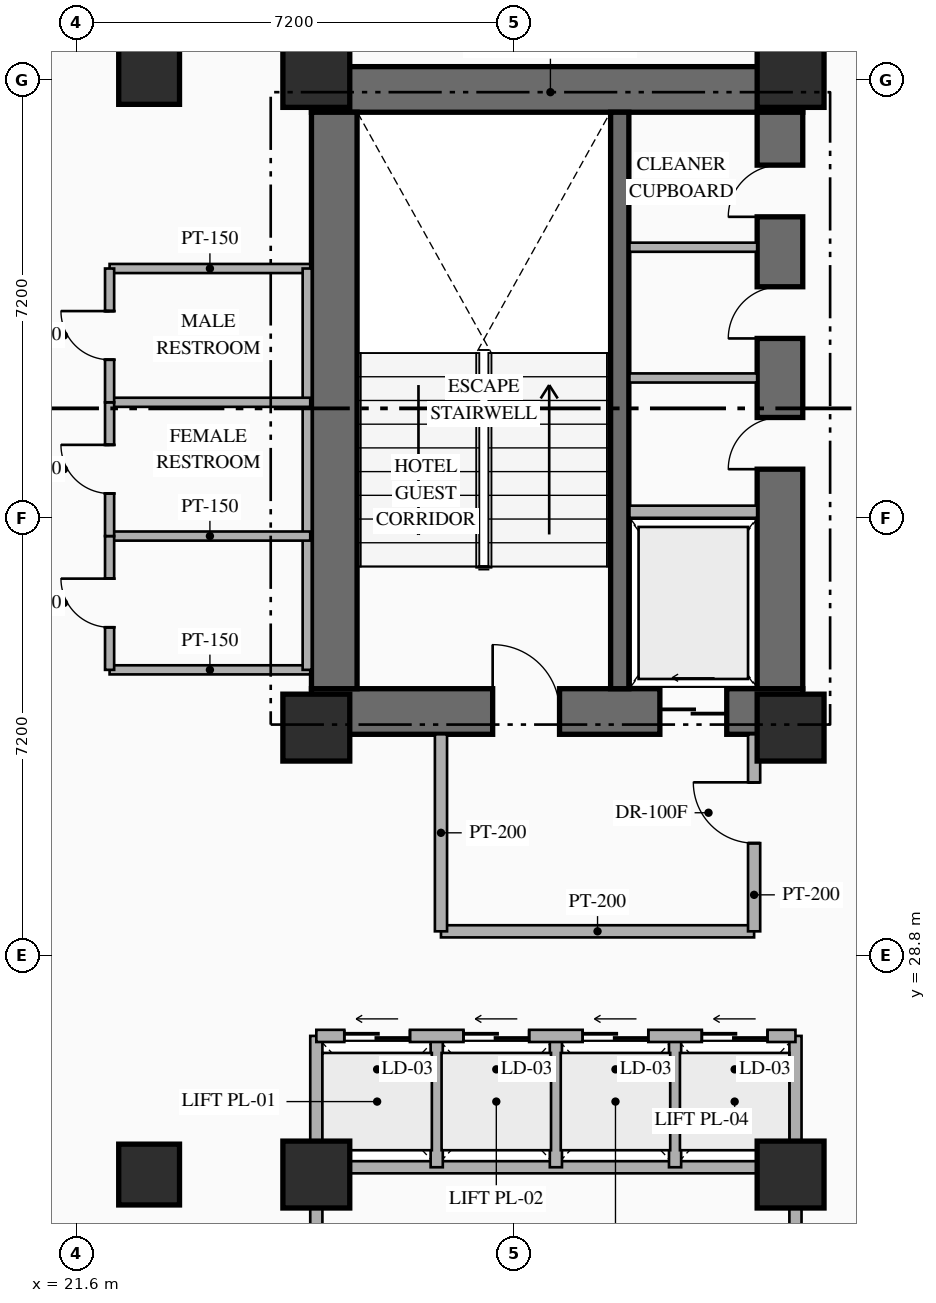
"""IFC4 building model, lengths in metres.
Left out: names, types, materials, properties, quantities, classifications, styles, units other than length and angle.
Written with IfcOpenShell. Run it as: python <this file> out.ifc"""

import sys

from ifc_helpers import new_model, si_unit, direction, frame, frame_2d, origin, origin_2d, place, context, subcontext, project, spatial, rectangle, hollow_rectangle, extrude, element, fill, save


model = new_model("IFC4")
c1 = context("Model", 3, precision=1e-05, world=origin(), true_north=direction((0.0, 1.0)))
c2 = subcontext(c1, "Body", "Model", "MODEL_VIEW")
j1 = project(units=[si_unit("LENGTHUNIT", "METRE"), si_unit("PLANEANGLEUNIT", "RADIAN")], contexts=[c1])
p1 = place(None, origin())
s1 = spatial("IfcSite", under=j1, at=p1, CompositionType="ELEMENT")
p2 = place(p1, origin())
s2 = spatial("IfcBuilding", under=s1, at=p2, CompositionType="ELEMENT")
p3 = place(p2, frame((0.0, 0.0, 39.95)))
s3 = spatial("IfcBuildingStorey", under=s2, at=p3, CompositionType="ELEMENT", Elevation=39.95)
p4 = place(p3, frame((25.47, 32.815, 0.0), z_axis=(0.0, 0.0, 1.0), x_axis=(1.0, 0.0, 0.0)))
e1 = element("IfcWall", 1, at=p4, inside=s3, PredefinedType="SHEAR", context=c2, shape_type="SweptSolid", body=[
    extrude(rectangle(XDim=8.08, YDim=0.75, at=frame_2d((4.04, 0.0))), origin(), (0.0, 0.0, 1.0), 3.35),
])
p5 = place(p4, frame((2.98, 0.0, 0.0)))
e2 = element("IfcOpeningElement", 2, at=p5, cuts=e1, PredefinedType="OPENING", context=c2, shape_type="SweptSolid", body=[
    extrude(rectangle(XDim=1.1, YDim=2.2, at=frame_2d((0.55, 1.1))), frame((0.0, 0.385, 0.0), z_axis=(0.0, -1.0, 0.0), x_axis=(1.0, 0.0, 0.0)), (0.0, 0.0, 1.0), 0.77),
])
p6 = place(p4, frame((5.73, 0.0, 0.0)))
e3 = element("IfcOpeningElement", 3, at=p6, cuts=e1, PredefinedType="OPENING", context=c2, shape_type="SweptSolid", body=[
    extrude(rectangle(XDim=1.1, YDim=2.15, at=frame_2d((0.55, 1.075))), frame((0.0, 0.385, 0.0), z_axis=(0.0, -1.0, 0.0), x_axis=(1.0, 0.0, 0.0)), (0.0, 0.0, 1.0), 0.77),
])
p7 = place(p3, frame((25.47, 43.045, 0.0), z_axis=(0.0, 0.0, 1.0), x_axis=(1.0, 0.0, 0.0)))
e4 = element("IfcWall", 4, at=p7, inside=s3, PredefinedType="SHEAR", context=c2, shape_type="SweptSolid", body=[
    extrude(rectangle(XDim=8.08, YDim=0.75, at=frame_2d((4.04, 0.0))), origin(), (0.0, 0.0, 1.0), 3.35),
])
p8 = place(p3, frame((25.845, 33.19, 0.0), z_axis=(0.0, 0.0, 1.0), x_axis=(0.0, 1.0, 0.0)))
e5 = element("IfcWall", 5, at=p8, inside=s3, PredefinedType="SHEAR", context=c2, shape_type="SweptSolid", body=[
    extrude(rectangle(XDim=9.48, YDim=0.75, at=frame_2d((4.74, 0.0))), origin(), (0.0, 0.0, 1.0), 3.35),
])
p9 = place(p3, frame((33.175, 33.19, 0.0), z_axis=(0.0, 0.0, 1.0), x_axis=(0.0, 1.0, 0.0)))
e6 = element("IfcWall", 6, at=p9, inside=s3, PredefinedType="SHEAR", context=c2, shape_type="SweptSolid", body=[
    extrude(rectangle(XDim=9.48, YDim=0.75, at=frame_2d((4.74, 0.0))), origin(), (0.0, 0.0, 1.0), 3.35),
])
p10 = place(p9, frame((3.61, 0.0, 0.0)))
e7 = element("IfcOpeningElement", 7, at=p10, cuts=e6, PredefinedType="OPENING", context=c2, shape_type="SweptSolid", body=[
    extrude(rectangle(XDim=0.85, YDim=2.08, at=frame_2d((0.425, 1.04))), frame((0.0, 0.385, 0.0), z_axis=(0.0, -1.0, 0.0), x_axis=(1.0, 0.0, 0.0)), (0.0, 0.0, 1.0), 0.77),
])
p11 = place(p9, frame((5.76, 0.0, 0.0)))
e8 = element("IfcOpeningElement", 8, at=p11, cuts=e6, PredefinedType="OPENING", context=c2, shape_type="SweptSolid", body=[
    extrude(rectangle(XDim=0.85, YDim=2.08, at=frame_2d((0.425, 1.04))), frame((0.0, 0.385, 0.0), z_axis=(0.0, -1.0, 0.0), x_axis=(1.0, 0.0, 0.0)), (0.0, 0.0, 1.0), 0.77),
])
p12 = place(p9, frame((7.76, 0.0, 0.0)))
e9 = element("IfcOpeningElement", 9, at=p12, cuts=e6, PredefinedType="OPENING", context=c2, shape_type="SweptSolid", body=[
    extrude(rectangle(XDim=0.85, YDim=2.08, at=frame_2d((0.425, 1.04))), frame((0.0, 0.385, 0.0), z_axis=(0.0, -1.0, 0.0), x_axis=(1.0, 0.0, 0.0)), (0.0, 0.0, 1.0), 0.77),
])
p13 = place(p3, frame((30.54, 33.19, 0.0), z_axis=(0.0, 0.0, 1.0), x_axis=(0.0, 1.0, 0.0)))
e10 = element("IfcWall", 10, at=p13, inside=s3, PredefinedType="SHEAR", context=c2, shape_type="SweptSolid", body=[
    extrude(rectangle(XDim=9.48, YDim=0.3, at=frame_2d((4.74, 0.0))), origin(), (0.0, 0.0, 1.0), 3.35),
])
for number, where, z_axis, x_axis in (
    (11, (25.55, 32.55, 0.0), (0.0, 0.0, 1.0), (1.0, 0.0, 0.0)),
    (12, (33.35, 32.55, 0.0), (0.0, 0.0, 1.0), (1.0, 0.0, 0.0)),
    (13, (25.55, 43.3, 0.0), (0.0, 0.0, 1.0), (1.0, 0.0, 0.0)),
    (14, (33.35, 43.3, 0.0), (0.0, 0.0, 1.0), (1.0, 0.0, 0.0)),
):
    element("IfcColumn", number, at=place(p3, frame(where, z_axis=z_axis, x_axis=x_axis)), inside=s3, PredefinedType="COLUMN", context=c2, shape_type="SweptSolid", body=[
        extrude(rectangle(XDim=1.1, YDim=1.1, at=origin_2d()), origin(), (0.0, 0.0, 1.0), 3.35),
    ])
for number, where, z_axis, x_axis in (
    (15, (25.55, 25.2, 0.0), (0.0, 0.0, 1.0), (1.0, 0.0, 0.0)),
    (16, (33.35, 25.2, 0.0), (0.0, 0.0, 1.0), (1.0, 0.0, 0.0)),
):
    element("IfcColumn", number, at=place(p3, frame(where, z_axis=z_axis, x_axis=x_axis)), inside=s3, PredefinedType="COLUMN", context=c2, shape_type="SweptSolid", body=[
        extrude(hollow_rectangle(XDim=1.1, YDim=1.1, WallThickness=0.04, at=origin_2d()), origin(), (0.0, 0.0, 1.0), 3.35),
    ])
for number, where, z_axis, x_axis in (
    (17, (22.8, 25.2, 0.0), (0.0, 0.0, 1.0), (1.0, 0.0, 0.0)),
    (18, (22.8, 43.3, 0.0), (0.0, 0.0, 1.0), (1.0, 0.0, 0.0)),
):
    element("IfcColumn", number, at=place(p3, frame(where, z_axis=z_axis, x_axis=x_axis)), inside=s3, PredefinedType="COLUMN", context=c2, shape_type="SweptSolid", body=[
        extrude(hollow_rectangle(XDim=1.0, YDim=1.0, WallThickness=0.038, at=origin_2d()), origin(), (0.0, 0.0, 1.0), 3.35),
    ])
p14 = place(p3, frame((30.7, 36.1, 0.0), z_axis=(0.0, 0.0, 1.0), x_axis=(1.0, 0.0, 0.0)))
e19 = element("IfcWall", 19, at=p14, inside=s3, PredefinedType="STANDARD", context=c2, shape_type="SweptSolid", body=[
    extrude(rectangle(XDim=2.1, YDim=0.2, at=frame_2d((1.05, 0.0))), origin(), (0.0, 0.0, 1.0), 3.13),
])
for number, where, z_axis, x_axis in (
    (20, (30.7, 38.3, 0.0), (0.0, 0.0, 1.0), (1.0, 0.0, 0.0)),
    (21, (30.7, 40.45, 0.0), (0.0, 0.0, 1.0), (1.0, 0.0, 0.0)),
):
    element("IfcWall", number, at=place(p3, frame(where, z_axis=z_axis, x_axis=x_axis)), inside=s3, PredefinedType="PARTITIONING", context=c2, shape_type="SweptSolid", body=[
        extrude(rectangle(XDim=2.1, YDim=0.15, at=frame_2d((1.05, 0.0))), origin(), (0.0, 0.0, 1.0), 3.13),
    ])
p15 = place(p3, frame((27.6, 29.2, 0.0), z_axis=(0.0, 0.0, 1.0), x_axis=(1.0, 0.0, 0.0)))
e22 = element("IfcWall", 22, at=p15, inside=s3, PredefinedType="STANDARD", context=c2, shape_type="SweptSolid", body=[
    extrude(rectangle(XDim=5.15, YDim=0.2, at=frame_2d((2.575, 0.0))), origin(), (0.0, 0.0, 1.0), 3.13),
])
p16 = place(p3, frame((27.6, 29.2, 0.0), z_axis=(0.0, 0.0, 1.0), x_axis=(0.0, 1.0, 0.0)))
e23 = element("IfcWall", 23, at=p16, inside=s3, PredefinedType="STANDARD", context=c2, shape_type="SweptSolid", body=[
    extrude(rectangle(XDim=3.24, YDim=0.2, at=frame_2d((1.62, 0.0))), origin(), (0.0, 0.0, 1.0), 3.13),
])
p17 = place(p3, frame((32.75, 29.2, 0.0), z_axis=(0.0, 0.0, 1.0), x_axis=(0.0, 1.0, 0.0)))
e24 = element("IfcWall", 24, at=p17, inside=s3, PredefinedType="STANDARD", context=c2, shape_type="SweptSolid", body=[
    extrude(rectangle(XDim=3.24, YDim=0.2, at=frame_2d((1.62, 0.0))), origin(), (0.0, 0.0, 1.0), 3.13),
])
p18 = place(p17, frame((1.45, 0.0, 0.0)))
e25 = element("IfcOpeningElement", 25, at=p18, cuts=e24, PredefinedType="OPENING", context=c2, shape_type="SweptSolid", body=[
    extrude(rectangle(XDim=1.0, YDim=2.2, at=frame_2d((0.5, 1.1))), frame((0.0, 0.11, 0.0), z_axis=(0.0, -1.0, 0.0), x_axis=(1.0, 0.0, 0.0)), (0.0, 0.0, 1.0), 0.22),
])
for number, where, z_axis, x_axis in (
    (26, (25.55, 23.4, 0.0), (0.0, 0.0, 1.0), (0.0, 1.0, 0.0)),
    (27, (33.43, 23.4, 0.0), (0.0, 0.0, 1.0), (0.0, 1.0, 0.0)),
):
    element("IfcWall", number, at=place(p3, frame(where, z_axis=z_axis, x_axis=x_axis)), inside=s3, PredefinedType="STANDARD", context=c2, shape_type="SweptSolid", body=[
        extrude(rectangle(XDim=4.08, YDim=0.2, at=frame_2d((2.04, 0.0))), origin(), (0.0, 0.0, 1.0), 2.425),
    ])
p19 = place(p3, frame((25.55, 25.32, 0.0), z_axis=(0.0, 0.0, 1.0), x_axis=(1.0, 0.0, 0.0)))
e28 = element("IfcWall", 28, at=p19, inside=s3, PredefinedType="STANDARD", context=c2, shape_type="SweptSolid", body=[
    extrude(rectangle(XDim=7.88, YDim=0.2, at=frame_2d((3.94, 0.0))), origin(), (0.0, 0.0, 1.0), 2.525),
])
for number, where, z_axis, x_axis in (
    (29, (27.53, 25.32, 0.0), (0.0, 0.0, 1.0), (0.0, 1.0, 0.0)),
    (30, (29.49, 25.32, 0.0), (0.0, 0.0, 1.0), (0.0, 1.0, 0.0)),
    (31, (31.45, 25.32, 0.0), (0.0, 0.0, 1.0), (0.0, 1.0, 0.0)),
):
    element("IfcWall", number, at=place(p3, frame(where, z_axis=z_axis, x_axis=x_axis)), inside=s3, PredefinedType="STANDARD", context=c2, shape_type="SweptSolid", body=[
        extrude(rectangle(XDim=2.16, YDim=0.2, at=frame_2d((1.08, 0.0))), origin(), (0.0, 0.0, 1.0), 3.13),
    ])
p20 = place(p3, frame((25.55, 27.48, 0.0), z_axis=(0.0, 0.0, 1.0), x_axis=(1.0, 0.0, 0.0)))
e32 = element("IfcWall", 32, at=p20, inside=s3, PredefinedType="STANDARD", context=c2, shape_type="SweptSolid", body=[
    extrude(rectangle(XDim=7.88, YDim=0.2, at=frame_2d((3.94, 0.0))), origin(), (0.0, 0.0, 1.0), 3.13),
])
p21 = place(p20, frame((0.46, 0.0, 0.0)))
e33 = element("IfcOpeningElement", 33, at=p21, cuts=e32, PredefinedType="OPENING", context=c2, shape_type="SweptSolid", body=[
    extrude(rectangle(XDim=1.08, YDim=2.15, at=frame_2d((0.54, 1.075))), frame((0.0, 0.11, 0.0), z_axis=(0.0, -1.0, 0.0), x_axis=(1.0, 0.0, 0.0)), (0.0, 0.0, 1.0), 0.22),
])
p22 = place(p20, frame((2.42, 0.0, 0.0)))
e34 = element("IfcOpeningElement", 34, at=p22, cuts=e32, PredefinedType="OPENING", context=c2, shape_type="SweptSolid", body=[
    extrude(rectangle(XDim=1.08, YDim=2.15, at=frame_2d((0.54, 1.075))), frame((0.0, 0.11, 0.0), z_axis=(0.0, -1.0, 0.0), x_axis=(1.0, 0.0, 0.0)), (0.0, 0.0, 1.0), 0.22),
])
p23 = place(p20, frame((4.38, 0.0, 0.0)))
e35 = element("IfcOpeningElement", 35, at=p23, cuts=e32, PredefinedType="OPENING", context=c2, shape_type="SweptSolid", body=[
    extrude(rectangle(XDim=1.08, YDim=2.15, at=frame_2d((0.54, 1.075))), frame((0.0, 0.11, 0.0), z_axis=(0.0, -1.0, 0.0), x_axis=(1.0, 0.0, 0.0)), (0.0, 0.0, 1.0), 0.22),
])
p24 = place(p20, frame((6.34, 0.0, 0.0)))
e36 = element("IfcOpeningElement", 36, at=p24, cuts=e32, PredefinedType="OPENING", context=c2, shape_type="SweptSolid", body=[
    extrude(rectangle(XDim=1.08, YDim=2.15, at=frame_2d((0.54, 1.075))), frame((0.0, 0.11, 0.0), z_axis=(0.0, -1.0, 0.0), x_axis=(1.0, 0.0, 0.0)), (0.0, 0.0, 1.0), 0.22),
])
for number, where, z_axis, x_axis in (
    (37, (22.15, 33.5, 0.0), (0.0, 0.0, 1.0), (1.0, 0.0, 0.0)),
    (38, (22.15, 40.1, 0.0), (0.0, 0.0, 1.0), (1.0, 0.0, 0.0)),
):
    element("IfcWall", number, at=place(p3, frame(where, z_axis=z_axis, x_axis=x_axis)), inside=s3, PredefinedType="PARTITIONING", context=c2, shape_type="SweptSolid", body=[
        extrude(rectangle(XDim=3.3, YDim=0.15, at=frame_2d((1.65, 0.0))), origin(), (0.0, 0.0, 1.0), 3.13),
    ])
p25 = place(p3, frame((25.4, 33.5, 0.0), z_axis=(0.0, 0.0, 1.0), x_axis=(0.0, 1.0, 0.0)))
e39 = element("IfcWall", 39, at=p25, inside=s3, PredefinedType="PARTITIONING", context=c2, shape_type="SweptSolid", body=[
    extrude(rectangle(XDim=6.6, YDim=0.15, at=frame_2d((3.3, 0.0))), origin(), (0.0, 0.0, 1.0), 3.13),
])
for number, where, z_axis, x_axis in (
    (40, (22.15, 35.7, 0.0), (0.0, 0.0, 1.0), (1.0, 0.0, 0.0)),
    (41, (22.15, 37.9, 0.0), (0.0, 0.0, 1.0), (1.0, 0.0, 0.0)),
):
    element("IfcWall", number, at=place(p3, frame(where, z_axis=z_axis, x_axis=x_axis)), inside=s3, PredefinedType="PARTITIONING", context=c2, shape_type="SweptSolid", body=[
        extrude(rectangle(XDim=3.3, YDim=0.15, at=frame_2d((1.65, 0.0))), origin(), (0.0, 0.0, 1.0), 3.13),
    ])
p26 = place(p3, frame((22.15, 33.5, 0.0), z_axis=(0.0, 0.0, 1.0), x_axis=(0.0, 1.0, 0.0)))
e42 = element("IfcWall", 42, at=p26, inside=s3, PredefinedType="PARTITIONING", context=c2, shape_type="SweptSolid", body=[
    extrude(rectangle(XDim=2.2, YDim=0.15, at=frame_2d((1.1, 0.0))), origin(), (0.0, 0.0, 1.0), 3.13),
])
p27 = place(p26, frame((0.7, 0.0, 0.0)))
e43 = element("IfcOpeningElement", 43, at=p27, cuts=e42, PredefinedType="OPENING", context=c2, shape_type="SweptSolid", body=[
    extrude(rectangle(XDim=0.8, YDim=2.06, at=frame_2d((0.4, 1.03))), frame((0.0, 0.085, 0.0), z_axis=(0.0, -1.0, 0.0), x_axis=(1.0, 0.0, 0.0)), (0.0, 0.0, 1.0), 0.17),
])
p28 = place(p3, frame((22.15, 35.7, 0.0), z_axis=(0.0, 0.0, 1.0), x_axis=(0.0, 1.0, 0.0)))
e44 = element("IfcWall", 44, at=p28, inside=s3, PredefinedType="PARTITIONING", context=c2, shape_type="SweptSolid", body=[
    extrude(rectangle(XDim=2.2, YDim=0.15, at=frame_2d((1.1, 0.0))), origin(), (0.0, 0.0, 1.0), 3.13),
])
p29 = place(p28, frame((0.7, 0.0, 0.0)))
e45 = element("IfcOpeningElement", 45, at=p29, cuts=e44, PredefinedType="OPENING", context=c2, shape_type="SweptSolid", body=[
    extrude(rectangle(XDim=0.8, YDim=2.06, at=frame_2d((0.4, 1.03))), frame((0.0, 0.085, 0.0), z_axis=(0.0, -1.0, 0.0), x_axis=(1.0, 0.0, 0.0)), (0.0, 0.0, 1.0), 0.17),
])
p30 = place(p3, frame((22.15, 37.9, 0.0), z_axis=(0.0, 0.0, 1.0), x_axis=(0.0, 1.0, 0.0)))
e46 = element("IfcWall", 46, at=p30, inside=s3, PredefinedType="PARTITIONING", context=c2, shape_type="SweptSolid", body=[
    extrude(rectangle(XDim=2.2, YDim=0.15, at=frame_2d((1.1, 0.0))), origin(), (0.0, 0.0, 1.0), 3.13),
])
p31 = place(p30, frame((0.7, 0.0, 0.0)))
e47 = element("IfcOpeningElement", 47, at=p31, cuts=e46, PredefinedType="OPENING", context=c2, shape_type="SweptSolid", body=[
    extrude(rectangle(XDim=0.8, YDim=2.06, at=frame_2d((0.4, 1.03))), frame((0.0, 0.085, 0.0), z_axis=(0.0, -1.0, 0.0), x_axis=(1.0, 0.0, 0.0)), (0.0, 0.0, 1.0), 0.17),
])
p32 = place(p3, frame((33.384, 17.312, 0.0), z_axis=(0.0, 0.0, 1.0), x_axis=(0.600008743659, 0.799993442181, 0.0)))
e48 = element("IfcWall", 48, at=p32, inside=s3, PredefinedType="PARTITIONING", context=c2, shape_type="SweptSolid", body=[
    extrude(rectangle(XDim=8.935, YDim=0.15, at=frame_2d((4.468, 0.0))), origin(), (0.0, 0.0, 1.0), 3.13),
])
p33 = place(p5, origin())
e49 = element("IfcDoor", 49, at=p33, inside=s3, OperationType="SINGLE_SWING_LEFT", PredefinedType="DOOR", context=c2, shape_type="SweptSolid", body=[
    extrude(rectangle(XDim=1.1, YDim=2.2, at=frame_2d((0.55, 1.1))), frame((0.0, 0.025, 0.0), z_axis=(0.0, -1.0, 0.0), x_axis=(1.0, 0.0, 0.0)), (0.0, 0.0, 1.0), 0.05),
])
fill(e2, e49)
p34 = place(p6, origin())
e50 = element("IfcDoor", 50, at=p34, inside=s3, OperationType="SLIDING_TO_LEFT", PredefinedType="USERDEFINED", context=c2, shape_type="SweptSolid", body=[
    extrude(rectangle(XDim=1.1, YDim=2.15, at=frame_2d((0.55, 1.075))), frame((0.0, 0.025, 0.0), z_axis=(0.0, -1.0, 0.0), x_axis=(1.0, 0.0, 0.0)), (0.0, 0.0, 1.0), 0.05),
])
fill(e3, e50)
p35 = place(p10, origin())
e51 = element("IfcDoor", 51, at=p35, inside=s3, OperationType="SINGLE_SWING_LEFT", PredefinedType="DOOR", context=c2, shape_type="SweptSolid", body=[
    extrude(rectangle(XDim=0.85, YDim=2.08, at=frame_2d((0.425, 1.04))), frame((0.0, 0.025, 0.0), z_axis=(0.0, -1.0, 0.0), x_axis=(1.0, 0.0, 0.0)), (0.0, 0.0, 1.0), 0.05),
])
fill(e7, e51)
p36 = place(p11, origin())
e52 = element("IfcDoor", 52, at=p36, inside=s3, OperationType="SINGLE_SWING_LEFT", PredefinedType="DOOR", context=c2, shape_type="SweptSolid", body=[
    extrude(rectangle(XDim=0.85, YDim=2.08, at=frame_2d((0.425, 1.04))), frame((0.0, 0.025, 0.0), z_axis=(0.0, -1.0, 0.0), x_axis=(1.0, 0.0, 0.0)), (0.0, 0.0, 1.0), 0.05),
])
fill(e8, e52)
p37 = place(p12, origin())
e53 = element("IfcDoor", 53, at=p37, inside=s3, OperationType="SINGLE_SWING_LEFT", PredefinedType="DOOR", context=c2, shape_type="SweptSolid", body=[
    extrude(rectangle(XDim=0.85, YDim=2.08, at=frame_2d((0.425, 1.04))), frame((0.0, 0.025, 0.0), z_axis=(0.0, -1.0, 0.0), x_axis=(1.0, 0.0, 0.0)), (0.0, 0.0, 1.0), 0.05),
])
fill(e9, e53)
p38 = place(p18, origin())
e54 = element("IfcDoor", 54, at=p38, inside=s3, OperationType="SINGLE_SWING_RIGHT", PredefinedType="DOOR", context=c2, shape_type="SweptSolid", body=[
    extrude(rectangle(XDim=1.0, YDim=2.2, at=frame_2d((0.5, 1.1))), frame((0.0, 0.025, 0.0), z_axis=(0.0, -1.0, 0.0), x_axis=(1.0, 0.0, 0.0)), (0.0, 0.0, 1.0), 0.05),
])
fill(e25, e54)
p39 = place(p21, origin())
e55 = element("IfcDoor", 55, at=p39, inside=s3, OperationType="SLIDING_TO_LEFT", PredefinedType="USERDEFINED", context=c2, shape_type="SweptSolid", body=[
    extrude(rectangle(XDim=1.08, YDim=2.15, at=frame_2d((0.54, 1.075))), frame((0.0, 0.025, 0.0), z_axis=(0.0, -1.0, 0.0), x_axis=(1.0, 0.0, 0.0)), (0.0, 0.0, 1.0), 0.05),
])
fill(e33, e55)
p40 = place(p22, origin())
e56 = element("IfcDoor", 56, at=p40, inside=s3, OperationType="SLIDING_TO_LEFT", PredefinedType="USERDEFINED", context=c2, shape_type="SweptSolid", body=[
    extrude(rectangle(XDim=1.08, YDim=2.15, at=frame_2d((0.54, 1.075))), frame((0.0, 0.025, 0.0), z_axis=(0.0, -1.0, 0.0), x_axis=(1.0, 0.0, 0.0)), (0.0, 0.0, 1.0), 0.05),
])
fill(e34, e56)
p41 = place(p23, origin())
e57 = element("IfcDoor", 57, at=p41, inside=s3, OperationType="SLIDING_TO_LEFT", PredefinedType="USERDEFINED", context=c2, shape_type="SweptSolid", body=[
    extrude(rectangle(XDim=1.08, YDim=2.15, at=frame_2d((0.54, 1.075))), frame((0.0, 0.025, 0.0), z_axis=(0.0, -1.0, 0.0), x_axis=(1.0, 0.0, 0.0)), (0.0, 0.0, 1.0), 0.05),
])
fill(e35, e57)
p42 = place(p24, origin())
e58 = element("IfcDoor", 58, at=p42, inside=s3, OperationType="SLIDING_TO_LEFT", PredefinedType="USERDEFINED", context=c2, shape_type="SweptSolid", body=[
    extrude(rectangle(XDim=1.08, YDim=2.15, at=frame_2d((0.54, 1.075))), frame((0.0, 0.025, 0.0), z_axis=(0.0, -1.0, 0.0), x_axis=(1.0, 0.0, 0.0)), (0.0, 0.0, 1.0), 0.05),
])
fill(e36, e58)
p43 = place(p27, origin())
e59 = element("IfcDoor", 59, at=p43, inside=s3, OperationType="SINGLE_SWING_RIGHT", PredefinedType="DOOR", context=c2, shape_type="SweptSolid", body=[
    extrude(rectangle(XDim=0.8, YDim=2.06, at=frame_2d((0.4, 1.03))), frame((0.0, 0.025, 0.0), z_axis=(0.0, -1.0, 0.0), x_axis=(1.0, 0.0, 0.0)), (0.0, 0.0, 1.0), 0.05),
])
fill(e43, e59)
p44 = place(p29, origin())
e60 = element("IfcDoor", 60, at=p44, inside=s3, OperationType="SINGLE_SWING_RIGHT", PredefinedType="DOOR", context=c2, shape_type="SweptSolid", body=[
    extrude(rectangle(XDim=0.8, YDim=2.06, at=frame_2d((0.4, 1.03))), frame((0.0, 0.025, 0.0), z_axis=(0.0, -1.0, 0.0), x_axis=(1.0, 0.0, 0.0)), (0.0, 0.0, 1.0), 0.05),
])
fill(e45, e60)
p45 = place(p31, origin())
e61 = element("IfcDoor", 61, at=p45, inside=s3, OperationType="SINGLE_SWING_RIGHT", PredefinedType="DOOR", context=c2, shape_type="SweptSolid", body=[
    extrude(rectangle(XDim=0.8, YDim=2.06, at=frame_2d((0.4, 1.03))), frame((0.0, 0.025, 0.0), z_axis=(0.0, -1.0, 0.0), x_axis=(1.0, 0.0, 0.0)), (0.0, 0.0, 1.0), 0.05),
])
fill(e47, e61)
save(model, sys.argv[1])
